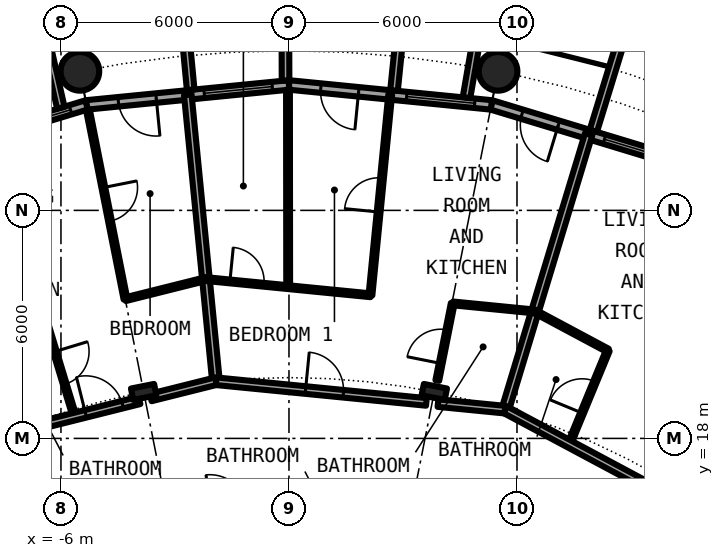
"""IFC4 building model, lengths in metres.
Left out: names, types, materials, properties, quantities, classifications, styles, units other than length and angle.
Written with IfcOpenShell. Run it as: python <this file> out.ifc"""

import sys

from ifc_helpers import new_model, si_unit, direction, frame, frame_2d, origin, origin_2d, place, context, subcontext, project, spatial, rectangle, circle, hollow_circle, i_section, extrude, element, fill, save


model = new_model("IFC4")
c1 = context("Model", 3, precision=1e-05, world=origin(), true_north=direction((0.0, 1.0)))
c2 = subcontext(c1, "Body", "Model", "MODEL_VIEW")
j1 = project(units=[si_unit("LENGTHUNIT", "METRE"), si_unit("PLANEANGLEUNIT", "RADIAN")], contexts=[c1])
p1 = place(None, origin())
s1 = spatial("IfcSite", under=j1, at=p1, CompositionType="ELEMENT")
p2 = place(p1, origin())
s2 = spatial("IfcBuilding", under=s1, at=p2, CompositionType="ELEMENT")
p3 = place(p2, frame((0.0, 0.0, 22.8)))
s3 = spatial("IfcBuildingStorey", under=s2, at=p3, CompositionType="ELEMENT", Elevation=22.8)
for number, where, z_axis, x_axis in (
    (1, (5.501, 27.658, 0.0), (0.0, 0.0, 1.0), (1.0, 0.0, 0.0)),
    (2, (-5.501, 27.658, 0.0), (0.0, 0.0, 1.0), (1.0, 0.0, 0.0)),
):
    element("IfcColumn", number, at=place(p3, frame(where, z_axis=z_axis, x_axis=x_axis)), inside=s3, PredefinedType="COLUMN", context=c2, shape_type="SweptSolid", body=[
        extrude(hollow_circle(Radius=0.508, WallThickness=0.05, at=origin_2d()), origin(), (0.0, 0.0, 1.0), 3.05),
    ])
for number, where, z_axis, x_axis in (
    (3, (3.824, 19.223, 0.0), (0.0, 0.0, 1.0), (0.195, 0.981, 0.0)),
    (4, (-3.824, 19.223, 0.0), (0.0, 0.0, 1.0), (-0.195, 0.981, 0.0)),
):
    element("IfcColumn", number, at=place(p3, frame(where, z_axis=z_axis, x_axis=x_axis)), inside=s3, PredefinedType="COLUMN", context=c2, shape_type="SweptSolid", body=[
        extrude(i_section(OverallWidth=0.305, OverallDepth=0.62, WebThickness=0.021, FlangeThickness=0.04, FilletRadius=0.027, at=origin_2d()), origin(), (0.0, 0.0, 1.0), 3.05),
    ])
p4 = place(p3, frame((10.447, 25.222, 0.0), z_axis=(0.0, 0.0, 1.0), x_axis=(-0.956965678721, 0.290201119486, 0.0)))
e5 = element("IfcWall", 5, at=p4, inside=s3, PredefinedType="SOLIDWALL", context=c2, shape_type="SweptSolid", body=[
    extrude(rectangle(XDim=5.351, YDim=0.25, at=frame_2d((2.676, 0.0))), origin(), (0.0, 0.0, 1.0), 2.7),
])
p5 = place(p4, frame((0.441, 0.0, 0.3)))
e6 = element("IfcOpeningElement", 6, at=p5, cuts=e5, PredefinedType="OPENING", context=c2, shape_type="SweptSolid", body=[
    extrude(rectangle(XDim=1.8, YDim=2.1, at=frame_2d((0.9, 1.05))), frame((0.0, 0.135, 0.0), z_axis=(0.0, -1.0, 0.0), x_axis=(1.0, 0.0, 0.0)), (0.0, 0.0, 1.0), 0.27),
])
p6 = place(p4, frame((3.51, 0.0, 0.0)))
e7 = element("IfcOpeningElement", 7, at=p6, cuts=e5, PredefinedType="OPENING", context=c2, shape_type="SweptSolid", body=[
    extrude(rectangle(XDim=1.0, YDim=2.2, at=frame_2d((0.5, 1.1))), frame((0.0, 0.135, 0.0), z_axis=(0.0, -1.0, 0.0), x_axis=(1.0, 0.0, 0.0)), (0.0, 0.0, 1.0), 0.27),
])
p7 = place(p3, frame((11.638, 28.084, -0.03), z_axis=(0.0, 0.0, 1.0), x_axis=(-0.941461077774, 0.337121697664, 0.0)))
e8 = element("IfcWall", 8, at=p7, inside=s3, PredefinedType="SOLIDWALL", context=c2, shape_type="SweptSolid", body=[
    extrude(rectangle(XDim=2.993, YDim=0.2, at=frame_2d((1.497, 0.0))), origin(), (0.0, 0.0, 1.0), 2.73),
])
p8 = place(p7, frame((0.457, 0.0, 0.33)))
e9 = element("IfcOpeningElement", 9, at=p8, cuts=e8, PredefinedType="OPENING", context=c2, shape_type="SweptSolid", body=[
    extrude(circle(Radius=1.04, at=frame_2d((1.04, 1.04))), frame((0.0, 0.11, 0.0), z_axis=(0.0, -1.0, 0.0), x_axis=(1.0, 0.0, 0.0)), (0.0, 0.0, 1.0), 0.22),
])
p9 = place(p3, frame((8.009, 26.092, -0.03), z_axis=(0.0, 0.0, 1.0), x_axis=(0.293406695073, 0.955987715029, 0.0)))
e10 = element("IfcWall", 10, at=p9, inside=s3, PredefinedType="SOLIDWALL", context=c2, shape_type="SweptSolid", body=[
    extrude(rectangle(XDim=3.006, YDim=0.2, at=frame_2d((1.503, 0.0))), origin(), (0.0, 0.0, 1.0), 2.73),
])
p10 = place(p3, frame((5.326, 26.775, 0.0), z_axis=(0.0, 0.0, 1.0), x_axis=(-0.995173996315, 0.098126026407, 0.0)))
e11 = element("IfcWall", 11, at=p10, inside=s3, PredefinedType="SOLIDWALL", context=c2, shape_type="SweptSolid", body=[
    extrude(rectangle(XDim=5.352, YDim=0.25, at=frame_2d((2.676, 0.0))), origin(), (0.0, 0.0, 1.0), 2.7),
])
p11 = place(p10, frame((0.441, 0.0, 0.3)))
e12 = element("IfcOpeningElement", 12, at=p11, cuts=e11, PredefinedType="OPENING", context=c2, shape_type="SweptSolid", body=[
    extrude(rectangle(XDim=1.8, YDim=2.1, at=frame_2d((0.9, 1.05))), frame((0.0, 0.135, 0.0), z_axis=(0.0, -1.0, 0.0), x_axis=(1.0, 0.0, 0.0)), (0.0, 0.0, 1.0), 0.27),
])
p12 = place(p10, frame((3.51, 0.0, 0.0)))
e13 = element("IfcOpeningElement", 13, at=p12, cuts=e11, PredefinedType="OPENING", context=c2, shape_type="SweptSolid", body=[
    extrude(rectangle(XDim=1.0, YDim=2.2, at=frame_2d((0.5, 1.1))), frame((0.0, 0.135, 0.0), z_axis=(0.0, -1.0, 0.0), x_axis=(1.0, 0.0, 0.0)), (0.0, 0.0, 1.0), 0.27),
])
p13 = place(p3, frame((4.671, 26.966, -0.03), z_axis=(0.0, 0.0, 1.0), x_axis=(0.170539878907, 0.985350774954, 0.0)))
e14 = element("IfcWall", 14, at=p13, inside=s3, PredefinedType="SOLIDWALL", context=c2, shape_type="SweptSolid", body=[
    extrude(rectangle(XDim=2.932, YDim=0.2, at=frame_2d((1.466, 0.0))), origin(), (0.0, 0.0, 1.0), 2.73),
])
p14 = place(p3, frame((2.764, 27.153, -0.03), z_axis=(0.0, 0.0, 1.0), x_axis=(0.101505487237, 0.994834979311, 0.0)))
e15 = element("IfcWall", 15, at=p14, inside=s3, PredefinedType="SOLIDWALL", context=c2, shape_type="SweptSolid", body=[
    extrude(rectangle(XDim=3.007, YDim=0.2, at=frame_2d((1.503, 0.0))), origin(), (0.0, 0.0, 1.0), 2.73),
])
p15 = place(p3, frame((0.0, 27.3, 0.0), z_axis=(0.0, 0.0, 1.0), x_axis=(-0.995173996315, -0.098126026407, 0.0)))
e16 = element("IfcWall", 16, at=p15, inside=s3, PredefinedType="SOLIDWALL", context=c2, shape_type="SweptSolid", body=[
    extrude(rectangle(XDim=5.352, YDim=0.25, at=frame_2d((2.676, 0.0))), origin(), (0.0, 0.0, 1.0), 2.7),
])
p16 = place(p15, frame((0.441, 0.0, 0.3)))
e17 = element("IfcOpeningElement", 17, at=p16, cuts=e16, PredefinedType="OPENING", context=c2, shape_type="SweptSolid", body=[
    extrude(rectangle(XDim=1.8, YDim=2.1, at=frame_2d((0.9, 1.05))), frame((0.0, 0.135, 0.0), z_axis=(0.0, -1.0, 0.0), x_axis=(1.0, 0.0, 0.0)), (0.0, 0.0, 1.0), 0.27),
])
p17 = place(p15, frame((3.51, 0.0, 0.0)))
e18 = element("IfcOpeningElement", 18, at=p17, cuts=e16, PredefinedType="OPENING", context=c2, shape_type="SweptSolid", body=[
    extrude(rectangle(XDim=1.0, YDim=2.2, at=frame_2d((0.5, 1.1))), frame((0.0, 0.135, 0.0), z_axis=(0.0, -1.0, 0.0), x_axis=(1.0, 0.0, 0.0)), (0.0, 0.0, 1.0), 0.27),
])
p18 = place(p3, frame((-0.09, 27.417, -0.03), z_axis=(0.0, 0.0, 1.0), x_axis=(-0.00347308367, 0.999993968827, 0.0)))
e19 = element("IfcWall", 19, at=p18, inside=s3, PredefinedType="SOLIDWALL", context=c2, shape_type="SweptSolid", body=[
    extrude(rectangle(XDim=2.882, YDim=0.2, at=frame_2d((1.441, 0.0))), origin(), (0.0, 0.0, 1.0), 2.73),
])
p19 = place(p3, frame((-2.586, 27.171, -0.03), z_axis=(0.0, 0.0, 1.0), x_axis=(-0.094548432284, 0.995520262954, 0.0)))
e20 = element("IfcWall", 20, at=p19, inside=s3, PredefinedType="SOLIDWALL", context=c2, shape_type="SweptSolid", body=[
    extrude(rectangle(XDim=3.006, YDim=0.2, at=frame_2d((1.503, 0.0))), origin(), (0.0, 0.0, 1.0), 2.73),
])
p20 = place(p3, frame((-5.326, 26.775, 0.0), z_axis=(0.0, 0.0, 1.0), x_axis=(-0.956965678721, -0.290201119486, 0.0)))
e21 = element("IfcWall", 21, at=p20, inside=s3, PredefinedType="SOLIDWALL", context=c2, shape_type="SweptSolid", body=[
    extrude(rectangle(XDim=5.351, YDim=0.25, at=frame_2d((2.676, 0.0))), origin(), (0.0, 0.0, 1.0), 2.7),
])
p21 = place(p20, frame((0.441, 0.0, 0.3)))
e22 = element("IfcOpeningElement", 22, at=p21, cuts=e21, PredefinedType="OPENING", context=c2, shape_type="SweptSolid", body=[
    extrude(rectangle(XDim=1.8, YDim=2.1, at=frame_2d((0.9, 1.05))), frame((0.0, 0.135, 0.0), z_axis=(0.0, -1.0, 0.0), x_axis=(1.0, 0.0, 0.0)), (0.0, 0.0, 1.0), 0.27),
])
p22 = place(p20, frame((3.51, 0.0, 0.0)))
e23 = element("IfcOpeningElement", 23, at=p22, cuts=e21, PredefinedType="OPENING", context=c2, shape_type="SweptSolid", body=[
    extrude(rectangle(XDim=1.0, YDim=2.2, at=frame_2d((0.5, 1.1))), frame((0.0, 0.135, 0.0), z_axis=(0.0, -1.0, 0.0), x_axis=(1.0, 0.0, 0.0)), (0.0, 0.0, 1.0), 0.27),
])
p23 = place(p3, frame((-6.004, 26.7, -0.03), z_axis=(0.0, 0.0, 1.0), x_axis=(-0.219609259383, 0.975587911566, 0.0)))
e24 = element("IfcWall", 24, at=p23, inside=s3, PredefinedType="SOLIDWALL", context=c2, shape_type="SweptSolid", body=[
    extrude(rectangle(XDim=2.933, YDim=0.2, at=frame_2d((1.466, 0.0))), origin(), (0.0, 0.0, 1.0), 2.73),
])
p24 = place(p3, frame((5.69, 18.756, 0.0), z_axis=(0.0, 0.0, 1.0), x_axis=(0.29005838641, 0.957008951094, 0.0)))
e25 = element("IfcWall", 25, at=p24, inside=s3, PredefinedType="PARTITIONING", context=c2, shape_type="SweptSolid", body=[
    extrude(rectangle(XDim=7.574, YDim=0.2, at=frame_2d((3.787, 0.0))), origin(), (0.0, 0.0, 1.0), 2.7),
])
p25 = place(p3, frame((-6.418, 21.133, 0.0), z_axis=(0.0, 0.0, 1.0), x_axis=(0.290478618436, -0.956881482855, 0.0)))
e26 = element("IfcWall", 26, at=p25, inside=s3, PredefinedType="PARTITIONING", context=c2, shape_type="SweptSolid", body=[
    extrude(rectangle(XDim=2.674, YDim=0.1, at=frame_2d((1.337, 0.0))), origin(), (0.0, 0.0, 1.0), 2.7),
])
p26 = place(p25, frame((0.887, 0.0, 0.0)))
e27 = element("IfcOpeningElement", 27, at=p26, cuts=e26, PredefinedType="OPENING", context=c2, shape_type="SweptSolid", body=[
    extrude(rectangle(XDim=0.9, YDim=2.3, at=frame_2d((0.45, 1.15))), frame((0.0, 0.06, 0.0), z_axis=(0.0, -1.0, 0.0), x_axis=(1.0, 0.0, 0.0)), (0.0, 0.0, 1.0), 0.12),
])
p27 = place(p3, frame((-5.293, 26.655, 0.0), z_axis=(0.0, 0.0, 1.0), x_axis=(0.194713709563, -0.980860118115, 0.0)))
e28 = element("IfcWall", 28, at=p27, inside=s3, PredefinedType="PARTITIONING", context=c2, shape_type="SweptSolid", body=[
    extrude(rectangle(XDim=5.089, YDim=0.1, at=frame_2d((2.545, 0.0))), origin(), (0.0, 0.0, 1.0), 2.7),
])
p28 = place(p27, frame((2.095, 0.0, 0.0)))
e29 = element("IfcOpeningElement", 29, at=p28, cuts=e28, PredefinedType="OPENING", context=c2, shape_type="SweptSolid", body=[
    extrude(rectangle(XDim=0.9, YDim=2.3, at=frame_2d((0.45, 1.15))), frame((0.0, 0.06, 0.0), z_axis=(0.0, -1.0, 0.0), x_axis=(1.0, 0.0, 0.0)), (0.0, 0.0, 1.0), 0.12),
])
p29 = place(p3, frame((-2.663, 27.044, 0.0), z_axis=(0.0, 0.0, 1.0), x_axis=(0.097987704654, -0.995187625394, 0.0)))
e30 = element("IfcWall", 30, at=p29, inside=s3, PredefinedType="PARTITIONING", context=c2, shape_type="SweptSolid", body=[
    extrude(rectangle(XDim=7.574, YDim=0.2, at=frame_2d((3.787, 0.0))), origin(), (0.0, 0.0, 1.0), 2.7),
])
p30 = place(p3, frame((-0.021, 21.979, 0.0), z_axis=(0.0, 0.0, 1.0), x_axis=(-0.00093971673, 0.999999558466, 0.0)))
e31 = element("IfcWall", 31, at=p30, inside=s3, PredefinedType="PARTITIONING", context=c2, shape_type="SweptSolid", body=[
    extrude(rectangle(XDim=5.196, YDim=0.1, at=frame_2d((2.598, 0.0))), origin(), (0.0, 0.0, 1.0), 2.7),
])
p31 = place(p3, frame((2.144, 21.766, 0.0), z_axis=(0.0, 0.0, 1.0), x_axis=(0.098054199821, 0.995181075934, 0.0)))
e32 = element("IfcWall", 32, at=p31, inside=s3, PredefinedType="PARTITIONING", context=c2, shape_type="SweptSolid", body=[
    extrude(rectangle(XDim=5.303, YDim=0.1, at=frame_2d((2.652, 0.0))), origin(), (0.0, 0.0, 1.0), 2.7),
])
p32 = place(p31, frame((2.202, 0.0, 0.0)))
e33 = element("IfcOpeningElement", 33, at=p32, cuts=e32, PredefinedType="OPENING", context=c2, shape_type="SweptSolid", body=[
    extrude(rectangle(XDim=0.9, YDim=2.3, at=frame_2d((0.45, 1.15))), frame((0.0, 0.06, 0.0), z_axis=(0.0, -1.0, 0.0), x_axis=(1.0, 0.0, 0.0)), (0.0, 0.0, 1.0), 0.12),
])
p33 = place(p3, frame((3.903, 19.524, 0.0), z_axis=(0.0, 0.0, 1.0), x_axis=(0.19620689099, 0.980562520153, 0.0)))
e34 = element("IfcWall", 34, at=p33, inside=s3, PredefinedType="PARTITIONING", context=c2, shape_type="SweptSolid", body=[
    extrude(rectangle(XDim=2.069, YDim=0.1, at=frame_2d((1.035, 0.0))), origin(), (0.0, 0.0, 1.0), 2.7),
])
p34 = place(p33, frame((0.458, 0.0, 0.0)))
e35 = element("IfcOpeningElement", 35, at=p34, cuts=e34, PredefinedType="OPENING", context=c2, shape_type="SweptSolid", body=[
    extrude(rectangle(XDim=0.9, YDim=2.3, at=frame_2d((0.45, 1.15))), frame((0.0, 0.06, 0.0), z_axis=(0.0, -1.0, 0.0), x_axis=(1.0, 0.0, 0.0)), (0.0, 0.0, 1.0), 0.12),
])
p35 = place(p3, frame((7.376, 17.855, 0.0), z_axis=(0.0, 0.0, 1.0), x_axis=(0.38190329031, 0.924202292169, 0.0)))
e36 = element("IfcWall", 36, at=p35, inside=s3, PredefinedType="PARTITIONING", context=c2, shape_type="SweptSolid", body=[
    extrude(rectangle(XDim=2.661, YDim=0.1, at=frame_2d((1.33, 0.0))), origin(), (0.0, 0.0, 1.0), 2.7),
])
p36 = place(p35, frame((0.88, 0.0, 0.0)))
e37 = element("IfcOpeningElement", 37, at=p36, cuts=e36, PredefinedType="OPENING", context=c2, shape_type="SweptSolid", body=[
    extrude(rectangle(XDim=0.9, YDim=2.3, at=frame_2d((0.45, 1.15))), frame((0.0, 0.06, 0.0), z_axis=(0.0, -1.0, 0.0), x_axis=(1.0, 0.0, 0.0)), (0.0, 0.0, 1.0), 0.12),
])
p37 = place(p3, frame((-1.928, 19.505, 0.0), z_axis=(0.0, 0.0, 1.0), x_axis=(0.995204127684, -0.097819958296, 0.0)))
e38 = element("IfcWall", 38, at=p37, inside=s3, PredefinedType="PARTITIONING", context=c2, shape_type="SweptSolid", body=[
    extrude(rectangle(XDim=5.571, YDim=0.2, at=frame_2d((2.785, 0.0))), origin(), (0.0, 0.0, 1.0), 2.38),
])
p38 = place(p37, frame((2.375, 0.0, 0.0)))
e39 = element("IfcOpeningElement", 39, at=p38, cuts=e38, PredefinedType="OPENING", context=c2, shape_type="SweptSolid", body=[
    extrude(rectangle(XDim=1.0, YDim=2.3, at=frame_2d((0.5, 1.15))), frame((0.0, 0.11, 0.0), z_axis=(0.0, -1.0, 0.0), x_axis=(1.0, 0.0, 0.0)), (0.0, 0.0, 1.0), 0.22),
])
p39 = place(p3, frame((3.921, 18.93, 0.0), z_axis=(0.0, 0.0, 1.0), x_axis=(0.995207057161, -0.097790149696, 0.0)))
e40 = element("IfcWall", 40, at=p39, inside=s3, PredefinedType="PARTITIONING", context=c2, shape_type="SweptSolid", body=[
    extrude(rectangle(XDim=1.778, YDim=0.2, at=frame_2d((0.889, 0.0))), origin(), (0.0, 0.0, 1.0), 2.38),
])
p40 = place(p3, frame((5.69, 18.756, 0.0), z_axis=(0.0, 0.0, 1.0), x_axis=(0.881866548297, -0.471499089072, 0.0)))
e41 = element("IfcWall", 41, at=p40, inside=s3, PredefinedType="PARTITIONING", context=c2, shape_type="SweptSolid", body=[
    extrude(rectangle(XDim=5.563, YDim=0.2, at=frame_2d((2.782, 0.0))), origin(), (0.0, 0.0, 1.0), 2.38),
])
p41 = place(p40, frame((4.161, 0.0, 0.0)))
e42 = element("IfcOpeningElement", 42, at=p41, cuts=e41, PredefinedType="OPENING", context=c2, shape_type="SweptSolid", body=[
    extrude(rectangle(XDim=1.0, YDim=2.3, at=frame_2d((0.5, 1.15))), frame((0.0, 0.11, 0.0), z_axis=(0.0, -1.0, 0.0), x_axis=(1.0, 0.0, 0.0)), (0.0, 0.0, 1.0), 0.22),
])
p42 = place(p3, frame((-7.501, 18.108, 0.0), z_axis=(0.0, 0.0, 1.0), x_axis=(0.970040840928, 0.242941900323, 0.0)))
e43 = element("IfcWall", 43, at=p42, inside=s3, PredefinedType="PARTITIONING", context=c2, shape_type="SweptSolid", body=[
    extrude(rectangle(XDim=3.676, YDim=0.2, at=frame_2d((1.838, 0.0))), origin(), (0.0, 0.0, 1.0), 2.38),
])
p43 = place(p42, frame((2.217, 0.0, 0.0)))
e44 = element("IfcOpeningElement", 44, at=p43, cuts=e43, PredefinedType="OPENING", context=c2, shape_type="SweptSolid", body=[
    extrude(rectangle(XDim=1.0, YDim=2.3, at=frame_2d((0.5, 1.15))), frame((0.0, 0.11, 0.0), z_axis=(0.0, -1.0, 0.0), x_axis=(1.0, 0.0, 0.0)), (0.0, 0.0, 1.0), 0.22),
])
p44 = place(p3, frame((-3.639, 19.076, 0.0), z_axis=(0.0, 0.0, 1.0), x_axis=(0.970053237222, 0.242892397895, 0.0)))
e45 = element("IfcWall", 45, at=p44, inside=s3, PredefinedType="PARTITIONING", context=c2, shape_type="SweptSolid", body=[
    extrude(rectangle(XDim=1.771, YDim=0.2, at=frame_2d((0.885, 0.0))), origin(), (0.0, 0.0, 1.0), 2.38),
])
p45 = place(p3, frame((-2.191, 22.193, 0.0), z_axis=(0.0, 0.0, 1.0), x_axis=(0.995194459907, -0.097918266785, 0.0)))
e46 = element("IfcWall", 46, at=p45, inside=s3, PredefinedType="PARTITIONING", context=c2, shape_type="SweptSolid", body=[
    extrude(rectangle(XDim=4.361, YDim=0.1, at=frame_2d((2.18, 0.0))), origin(), (0.0, 0.0, 1.0), 2.7),
])
p46 = place(p45, frame((0.64, 0.0, 0.0)))
e47 = element("IfcOpeningElement", 47, at=p46, cuts=e46, PredefinedType="OPENING", context=c2, shape_type="SweptSolid", body=[
    extrude(rectangle(XDim=0.9, YDim=2.3, at=frame_2d((0.45, 1.15))), frame((0.0, 0.06, 0.0), z_axis=(0.0, -1.0, 0.0), x_axis=(1.0, 0.0, 0.0)), (0.0, 0.0, 1.0), 0.12),
])
p47 = place(p3, frame((4.313, 21.552, 0.0), z_axis=(0.0, 0.0, 1.0), x_axis=(0.995195976339, -0.097902853268, 0.0)))
e48 = element("IfcWall", 48, at=p47, inside=s3, PredefinedType="PARTITIONING", context=c2, shape_type="SweptSolid", body=[
    extrude(rectangle(XDim=2.175, YDim=0.1, at=frame_2d((1.087, 0.0))), origin(), (0.0, 0.0, 1.0), 2.7),
])
p48 = place(p3, frame((6.473, 21.34, 0.0), z_axis=(0.0, 0.0, 1.0), x_axis=(0.881864921102, -0.471502132476, 0.0)))
e49 = element("IfcWall", 49, at=p48, inside=s3, PredefinedType="PARTITIONING", context=c2, shape_type="SweptSolid", body=[
    extrude(rectangle(XDim=2.176, YDim=0.1, at=frame_2d((1.088, 0.0))), origin(), (0.0, 0.0, 1.0), 2.7),
])
p49 = place(p3, frame((-4.303, 21.663, 0.0), z_axis=(0.0, 0.0, 1.0), x_axis=(0.970056889313, 0.242877811867, 0.0)))
e50 = element("IfcWall", 50, at=p49, inside=s3, PredefinedType="PARTITIONING", context=c2, shape_type="SweptSolid", body=[
    extrude(rectangle(XDim=2.182, YDim=0.1, at=frame_2d((1.091, 0.0))), origin(), (0.0, 0.0, 1.0), 2.7),
])
p50 = place(p5, origin())
e51 = element("IfcWindow", 51, at=p50, inside=s3, PartitioningType="SINGLE_PANEL", PredefinedType="WINDOW", context=c2, shape_type="SweptSolid", body=[
    extrude(rectangle(XDim=1.8, YDim=2.1, at=frame_2d((0.9, 1.05))), frame((0.0, 0.03, 0.0), z_axis=(0.0, -1.0, 0.0), x_axis=(1.0, 0.0, 0.0)), (0.0, 0.0, 1.0), 0.06),
])
fill(e6, e51)
p51 = place(p6, origin())
e52 = element("IfcDoor", 52, at=p51, inside=s3, OperationType="SINGLE_SWING_LEFT", PredefinedType="DOOR", context=c2, shape_type="SweptSolid", body=[
    extrude(rectangle(XDim=1.0, YDim=2.2, at=frame_2d((0.5, 1.1))), frame((0.0, 0.025, 0.0), z_axis=(0.0, -1.0, 0.0), x_axis=(1.0, 0.0, 0.0)), (0.0, 0.0, 1.0), 0.05),
])
fill(e7, e52)
p52 = place(p11, origin())
e53 = element("IfcWindow", 53, at=p52, inside=s3, PartitioningType="SINGLE_PANEL", PredefinedType="WINDOW", context=c2, shape_type="SweptSolid", body=[
    extrude(rectangle(XDim=1.8, YDim=2.1, at=frame_2d((0.9, 1.05))), frame((0.0, 0.03, 0.0), z_axis=(0.0, -1.0, 0.0), x_axis=(1.0, 0.0, 0.0)), (0.0, 0.0, 1.0), 0.06),
])
fill(e12, e53)
p53 = place(p12, origin())
e54 = element("IfcDoor", 54, at=p53, inside=s3, OperationType="SINGLE_SWING_LEFT", PredefinedType="DOOR", context=c2, shape_type="SweptSolid", body=[
    extrude(rectangle(XDim=1.0, YDim=2.2, at=frame_2d((0.5, 1.1))), frame((0.0, 0.025, 0.0), z_axis=(0.0, -1.0, 0.0), x_axis=(1.0, 0.0, 0.0)), (0.0, 0.0, 1.0), 0.05),
])
fill(e13, e54)
p54 = place(p16, origin())
e55 = element("IfcWindow", 55, at=p54, inside=s3, PartitioningType="SINGLE_PANEL", PredefinedType="WINDOW", context=c2, shape_type="SweptSolid", body=[
    extrude(rectangle(XDim=1.8, YDim=2.1, at=frame_2d((0.9, 1.05))), frame((0.0, 0.03, 0.0), z_axis=(0.0, -1.0, 0.0), x_axis=(1.0, 0.0, 0.0)), (0.0, 0.0, 1.0), 0.06),
])
fill(e17, e55)
p55 = place(p17, origin())
e56 = element("IfcDoor", 56, at=p55, inside=s3, OperationType="SINGLE_SWING_LEFT", PredefinedType="DOOR", context=c2, shape_type="SweptSolid", body=[
    extrude(rectangle(XDim=1.0, YDim=2.2, at=frame_2d((0.5, 1.1))), frame((0.0, 0.025, 0.0), z_axis=(0.0, -1.0, 0.0), x_axis=(1.0, 0.0, 0.0)), (0.0, 0.0, 1.0), 0.05),
])
fill(e18, e56)
p56 = place(p21, origin())
e57 = element("IfcWindow", 57, at=p56, inside=s3, PartitioningType="SINGLE_PANEL", PredefinedType="WINDOW", context=c2, shape_type="SweptSolid", body=[
    extrude(rectangle(XDim=1.8, YDim=2.1, at=frame_2d((0.9, 1.05))), frame((0.0, 0.03, 0.0), z_axis=(0.0, -1.0, 0.0), x_axis=(1.0, 0.0, 0.0)), (0.0, 0.0, 1.0), 0.06),
])
fill(e22, e57)
p57 = place(p36, origin())
e58 = element("IfcDoor", 58, at=p57, inside=s3, OperationType="SINGLE_SWING_RIGHT", PredefinedType="DOOR", context=c2, shape_type="SweptSolid", body=[
    extrude(rectangle(XDim=0.9, YDim=2.3, at=frame_2d((0.45, 1.15))), frame((0.0, 0.025, 0.0), z_axis=(0.0, -1.0, 0.0), x_axis=(1.0, 0.0, 0.0)), (0.0, 0.0, 1.0), 0.05),
])
fill(e37, e58)
p58 = place(p38, origin())
e59 = element("IfcDoor", 59, at=p58, inside=s3, OperationType="SINGLE_SWING_RIGHT", PredefinedType="DOOR", context=c2, shape_type="SweptSolid", body=[
    extrude(rectangle(XDim=1.0, YDim=2.3, at=frame_2d((0.5, 1.15))), frame((0.0, 0.025, 0.0), z_axis=(0.0, -1.0, 0.0), x_axis=(1.0, 0.0, 0.0)), (0.0, 0.0, 1.0), 0.05),
])
fill(e39, e59)
p59 = place(p34, origin())
e60 = element("IfcDoor", 60, at=p59, inside=s3, OperationType="SINGLE_SWING_LEFT", PredefinedType="DOOR", context=c2, shape_type="SweptSolid", body=[
    extrude(rectangle(XDim=0.9, YDim=2.3, at=frame_2d((0.45, 1.15))), frame((0.0, 0.025, 0.0), z_axis=(0.0, -1.0, 0.0), x_axis=(1.0, 0.0, 0.0)), (0.0, 0.0, 1.0), 0.05),
])
fill(e35, e60)
p60 = place(p32, origin())
e61 = element("IfcDoor", 61, at=p60, inside=s3, OperationType="SINGLE_SWING_LEFT", PredefinedType="DOOR", context=c2, shape_type="SweptSolid", body=[
    extrude(rectangle(XDim=0.9, YDim=2.3, at=frame_2d((0.45, 1.15))), frame((0.0, 0.025, 0.0), z_axis=(0.0, -1.0, 0.0), x_axis=(1.0, 0.0, 0.0)), (0.0, 0.0, 1.0), 0.05),
])
fill(e33, e61)
p61 = place(p46, origin())
e62 = element("IfcDoor", 62, at=p61, inside=s3, OperationType="SINGLE_SWING_LEFT", PredefinedType="DOOR", context=c2, shape_type="SweptSolid", body=[
    extrude(rectangle(XDim=0.9, YDim=2.3, at=frame_2d((0.45, 1.15))), frame((0.0, 0.025, 0.0), z_axis=(0.0, -1.0, 0.0), x_axis=(1.0, 0.0, 0.0)), (0.0, 0.0, 1.0), 0.05),
])
fill(e47, e62)
p62 = place(p43, origin())
e63 = element("IfcDoor", 63, at=p62, inside=s3, OperationType="SINGLE_SWING_RIGHT", PredefinedType="DOOR", context=c2, shape_type="SweptSolid", body=[
    extrude(rectangle(XDim=1.0, YDim=2.3, at=frame_2d((0.5, 1.15))), frame((0.0, 0.025, 0.0), z_axis=(0.0, -1.0, 0.0), x_axis=(1.0, 0.0, 0.0)), (0.0, 0.0, 1.0), 0.05),
])
fill(e44, e63)
p63 = place(p26, origin())
e64 = element("IfcDoor", 64, at=p63, inside=s3, OperationType="SINGLE_SWING_RIGHT", PredefinedType="DOOR", context=c2, shape_type="SweptSolid", body=[
    extrude(rectangle(XDim=0.9, YDim=2.3, at=frame_2d((0.45, 1.15))), frame((0.0, 0.025, 0.0), z_axis=(0.0, -1.0, 0.0), x_axis=(1.0, 0.0, 0.0)), (0.0, 0.0, 1.0), 0.05),
])
fill(e27, e64)
p64 = place(p28, origin())
e65 = element("IfcDoor", 65, at=p64, inside=s3, OperationType="SINGLE_SWING_RIGHT", PredefinedType="DOOR", context=c2, shape_type="SweptSolid", body=[
    extrude(rectangle(XDim=0.9, YDim=2.3, at=frame_2d((0.45, 1.15))), frame((0.0, 0.025, 0.0), z_axis=(0.0, -1.0, 0.0), x_axis=(1.0, 0.0, 0.0)), (0.0, 0.0, 1.0), 0.05),
])
fill(e29, e65)
save(model, sys.argv[1])
